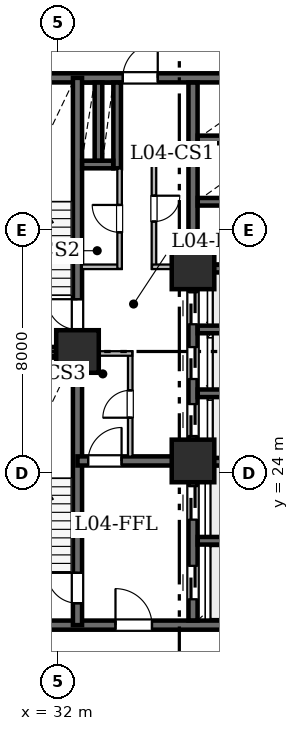
"""IFC4 building model, lengths in metres.
Left out: names, types, materials, properties, quantities, classifications, styles, units other than length and angle.
Written with IfcOpenShell. Run it as: python <this file> out.ifc"""

import sys

from ifc_helpers import new_model, si_unit, direction, frame, frame_2d, origin, origin_2d, place, context, subcontext, project, spatial, rectangle, hollow_rectangle, extrude, element, fill, save


model = new_model("IFC4")
c1 = context("Model", 3, precision=1e-05, world=origin(), true_north=direction((0.0, 1.0)))
c2 = subcontext(c1, "Body", "Model", "MODEL_VIEW")
j1 = project(units=[si_unit("LENGTHUNIT", "METRE"), si_unit("PLANEANGLEUNIT", "RADIAN")], contexts=[c1])
p1 = place(None, origin())
s1 = spatial("IfcSite", under=j1, at=p1, CompositionType="ELEMENT")
p2 = place(p1, origin())
s2 = spatial("IfcBuilding", under=s1, at=p2, CompositionType="ELEMENT")
p3 = place(p2, frame((0.0, 0.0, 20.4)))
s3 = spatial("IfcBuildingStorey", under=s2, at=p3, CompositionType="ELEMENT", Elevation=20.4)
for number, where, z_axis, x_axis in (
    (1, (32.65, 28.0, 0.0), (0.0, 0.0, 1.0), (1.0, 0.0, 0.0)),
    (2, (36.45, 24.4, 0.0), (0.0, 0.0, 1.0), (1.0, 0.0, 0.0)),
    (3, (36.45, 30.75, 0.0), (0.0, 0.0, 1.0), (1.0, 0.0, 0.0)),
):
    element("IfcColumn", number, at=place(p3, frame(where, z_axis=z_axis, x_axis=x_axis)), inside=s3, PredefinedType="COLUMN", context=c2, shape_type="SweptSolid", body=[
        extrude(hollow_rectangle(XDim=1.4, YDim=1.4, WallThickness=0.07, at=origin_2d()), origin(), (0.0, 0.0, 1.0), 4.2),
    ])
p4 = place(p3, frame((29.0, 19.0, 0.0), z_axis=(0.0, 0.0, 1.0), x_axis=(1.0, 0.0, 0.0)))
e4 = element("IfcWall", 4, at=p4, inside=s3, PredefinedType="SHEAR", context=c2, shape_type="SweptSolid", body=[
    extrude(rectangle(XDim=10.4, YDim=0.3, at=frame_2d((5.2, 0.0))), origin(), (0.0, 0.0, 1.0), 3.92),
])
p5 = place(p4, frame((4.9, 0.0, 0.0)))
e5 = element("IfcOpeningElement", 5, at=p5, cuts=e4, PredefinedType="OPENING", context=c2, shape_type="SweptSolid", body=[
    extrude(rectangle(XDim=1.2, YDim=2.15, at=frame_2d((0.6, 1.075))), frame((0.0, 0.16, 0.0), z_axis=(0.0, -1.0, 0.0), x_axis=(1.0, 0.0, 0.0)), (0.0, 0.0, 1.0), 0.32),
])
p6 = place(p3, frame((29.0, 37.0, 0.0), z_axis=(0.0, 0.0, 1.0), x_axis=(1.0, 0.0, 0.0)))
e6 = element("IfcWall", 6, at=p6, inside=s3, PredefinedType="SHEAR", context=c2, shape_type="SweptSolid", body=[
    extrude(rectangle(XDim=10.4, YDim=0.3, at=frame_2d((5.2, 0.0))), origin(), (0.0, 0.0, 1.0), 3.92),
])
p7 = place(p6, frame((5.14, 0.0, 0.0)))
e7 = element("IfcOpeningElement", 7, at=p7, cuts=e6, PredefinedType="OPENING", context=c2, shape_type="SweptSolid", body=[
    extrude(rectangle(XDim=1.15, YDim=2.2, at=frame_2d((0.575, 1.1))), frame((0.0, 0.16, 0.0), z_axis=(0.0, -1.0, 0.0), x_axis=(1.0, 0.0, 0.0)), (0.0, 0.0, 1.0), 0.32),
])
p8 = place(p3, frame((32.65, 19.0, 0.0), z_axis=(0.0, 0.0, 1.0), x_axis=(0.0, 1.0, 0.0)))
e8 = element("IfcWall", 8, at=p8, inside=s3, PredefinedType="SHEAR", context=c2, shape_type="SweptSolid", body=[
    extrude(rectangle(XDim=9.0, YDim=0.3, at=frame_2d((4.5, 0.0))), origin(), (0.0, 0.0, 1.0), 3.92),
])
p9 = place(p8, frame((0.72, 0.0, 0.0)))
e9 = element("IfcOpeningElement", 9, at=p9, cuts=e8, PredefinedType="OPENING", context=c2, shape_type="SweptSolid", body=[
    extrude(rectangle(XDim=1.0, YDim=2.15, at=frame_2d((0.5, 1.075))), frame((0.0, 0.16, 0.0), z_axis=(0.0, -1.0, 0.0), x_axis=(1.0, 0.0, 0.0)), (0.0, 0.0, 1.0), 0.32),
])
p10 = place(p3, frame((32.65, 28.0, 0.0), z_axis=(0.0, 0.0, 1.0), x_axis=(0.0, 1.0, 0.0)))
e10 = element("IfcWall", 10, at=p10, inside=s3, PredefinedType="SHEAR", context=c2, shape_type="SweptSolid", body=[
    extrude(rectangle(XDim=9.0, YDim=0.3, at=frame_2d((4.5, 0.0))), origin(), (0.0, 0.0, 1.0), 3.92),
])
p11 = place(p10, frame((0.72, 0.0, 0.0)))
e11 = element("IfcOpeningElement", 11, at=p11, cuts=e10, PredefinedType="OPENING", context=c2, shape_type="SweptSolid", body=[
    extrude(rectangle(XDim=1.0, YDim=2.15, at=frame_2d((0.5, 1.075))), frame((0.0, 0.16, 0.0), z_axis=(0.0, -1.0, 0.0), x_axis=(1.0, 0.0, 0.0)), (0.0, 0.0, 1.0), 0.32),
])
p12 = place(p3, frame((29.0, 28.0, 0.0), z_axis=(0.0, 0.0, 1.0), x_axis=(1.0, 0.0, 0.0)))
e12 = element("IfcWall", 12, at=p12, inside=s3, PredefinedType="SHEAR", context=c2, shape_type="SweptSolid", body=[
    extrude(rectangle(XDim=3.65, YDim=0.3, at=frame_2d((1.825, 0.0))), origin(), (0.0, 0.0, 1.0), 3.92),
])
p13 = place(p3, frame((32.65, 24.4, 0.0), z_axis=(0.0, 0.0, 1.0), x_axis=(1.0, 0.0, 0.0)))
e13 = element("IfcWall", 13, at=p13, inside=s3, PredefinedType="SHEAR", context=c2, shape_type="SweptSolid", body=[
    extrude(rectangle(XDim=3.8, YDim=0.3, at=frame_2d((1.9, 0.0))), origin(), (0.0, 0.0, 1.0), 3.92),
])
p14 = place(p13, frame((0.35, 0.0, 0.0)))
e14 = element("IfcOpeningElement", 14, at=p14, cuts=e13, PredefinedType="OPENING", context=c2, shape_type="SweptSolid", body=[
    extrude(rectangle(XDim=1.1, YDim=2.15, at=frame_2d((0.55, 1.075))), frame((0.0, 0.16, 0.0), z_axis=(0.0, -1.0, 0.0), x_axis=(1.0, 0.0, 0.0)), (0.0, 0.0, 1.0), 0.32),
])
p15 = place(p3, frame((36.45, 19.154, 0.0), z_axis=(0.0, 0.0, 1.0), x_axis=(0.0, 1.0, 0.0)))
e15 = element("IfcWall", 15, at=p15, inside=s3, PredefinedType="SHEAR", context=c2, shape_type="SweptSolid", body=[
    extrude(rectangle(XDim=4.546, YDim=0.3, at=frame_2d((2.273, 0.0))), origin(), (0.0, 0.0, 1.0), 3.92),
])
p16 = place(p15, frame((0.696, 0.0, 0.0)))
e16 = element("IfcOpeningElement", 16, at=p16, cuts=e15, PredefinedType="OPENING", context=c2, shape_type="SweptSolid", body=[
    extrude(rectangle(XDim=1.1, YDim=2.15, at=frame_2d((0.55, 1.075))), frame((0.0, 0.16, 0.0), z_axis=(0.0, -1.0, 0.0), x_axis=(1.0, 0.0, 0.0)), (0.0, 0.0, 1.0), 0.32),
])
p17 = place(p15, frame((3.316, 0.0, 0.0)))
e17 = element("IfcOpeningElement", 17, at=p17, cuts=e15, PredefinedType="OPENING", context=c2, shape_type="SweptSolid", body=[
    extrude(rectangle(XDim=1.1, YDim=2.15, at=frame_2d((0.55, 1.075))), frame((0.0, 0.16, 0.0), z_axis=(0.0, -1.0, 0.0), x_axis=(1.0, 0.0, 0.0)), (0.0, 0.0, 1.0), 0.32),
])
p18 = place(p3, frame((36.45, 25.1, 0.0), z_axis=(0.0, 0.0, 1.0), x_axis=(0.0, 1.0, 0.0)))
e18 = element("IfcWall", 18, at=p18, inside=s3, PredefinedType="SHEAR", context=c2, shape_type="SweptSolid", body=[
    extrude(rectangle(XDim=4.95, YDim=0.3, at=frame_2d((2.475, 0.0))), origin(), (0.0, 0.0, 1.0), 3.92),
])
p19 = place(p18, frame((0.12, 0.0, 0.0)))
e19 = element("IfcOpeningElement", 19, at=p19, cuts=e18, PredefinedType="OPENING", context=c2, shape_type="SweptSolid", body=[
    extrude(rectangle(XDim=1.05, YDim=2.15, at=frame_2d((0.525, 1.075))), frame((0.0, 0.16, 0.0), z_axis=(0.0, -1.0, 0.0), x_axis=(1.0, 0.0, 0.0)), (0.0, 0.0, 1.0), 0.32),
])
p20 = place(p18, frame((1.995, 0.0, 0.0)))
e20 = element("IfcOpeningElement", 20, at=p20, cuts=e18, PredefinedType="OPENING", context=c2, shape_type="SweptSolid", body=[
    extrude(rectangle(XDim=1.05, YDim=2.15, at=frame_2d((0.525, 1.075))), frame((0.0, 0.16, 0.0), z_axis=(0.0, -1.0, 0.0), x_axis=(1.0, 0.0, 0.0)), (0.0, 0.0, 1.0), 0.32),
])
p21 = place(p18, frame((3.795, 0.0, 0.0)))
e21 = element("IfcOpeningElement", 21, at=p21, cuts=e18, PredefinedType="OPENING", context=c2, shape_type="SweptSolid", body=[
    extrude(rectangle(XDim=1.05, YDim=2.15, at=frame_2d((0.525, 1.075))), frame((0.0, 0.16, 0.0), z_axis=(0.0, -1.0, 0.0), x_axis=(1.0, 0.0, 0.0)), (0.0, 0.0, 1.0), 0.32),
])
p22 = place(p3, frame((36.45, 31.45, 0.0), z_axis=(0.0, 0.0, 1.0), x_axis=(0.0, 1.0, 0.0)))
e22 = element("IfcWall", 22, at=p22, inside=s3, PredefinedType="SHEAR", context=c2, shape_type="SweptSolid", body=[
    extrude(rectangle(XDim=5.396, YDim=0.3, at=frame_2d((2.698, 0.0))), origin(), (0.0, 0.0, 1.0), 3.92),
])
for number, where, z_axis, x_axis in (
    (23, (36.604, 21.775, 0.0), (0.0, 0.0, 1.0), (1.0, 0.0, 0.0)),
    (24, (36.604, 24.375, 0.0), (0.0, 0.0, 1.0), (1.0, 0.0, 0.0)),
    (25, (36.604, 26.625, 0.0), (0.0, 0.0, 1.0), (1.0, 0.0, 0.0)),
    (26, (36.604, 28.725, 0.0), (0.0, 0.0, 1.0), (1.0, 0.0, 0.0)),
    (27, (36.604, 30.725, 0.0), (0.0, 0.0, 1.0), (1.0, 0.0, 0.0)),
    (28, (36.604, 32.925, 0.0), (0.0, 0.0, 1.0), (1.0, 0.0, 0.0)),
    (29, (36.604, 34.975, 0.0), (0.0, 0.0, 1.0), (1.0, 0.0, 0.0)),
):
    element("IfcWall", number, at=place(p3, frame(where, z_axis=z_axis, x_axis=x_axis)), inside=s3, PredefinedType="SHEAR", context=c2, shape_type="SweptSolid", body=[
        extrude(rectangle(XDim=2.642, YDim=0.25, at=frame_2d((1.321, 0.0))), origin(), (0.0, 0.0, 1.0), 3.92),
    ])
p23 = place(p3, frame((33.955, 34.025, 0.0), z_axis=(0.0, 0.0, 1.0), x_axis=(0.0, 1.0, 0.0)))
e30 = element("IfcWall", 30, at=p23, inside=s3, PredefinedType="SHEAR", context=c2, shape_type="SweptSolid", body=[
    extrude(rectangle(XDim=2.821, YDim=0.25, at=frame_2d((1.411, 0.0))), origin(), (0.0, 0.0, 1.0), 3.92),
])
p24 = place(p3, frame((32.804, 34.15, 0.0), z_axis=(0.0, 0.0, 1.0), x_axis=(1.0, 0.0, 0.0)))
e31 = element("IfcWall", 31, at=p24, inside=s3, PredefinedType="SHEAR", context=c2, shape_type="SweptSolid", body=[
    extrude(rectangle(XDim=1.022, YDim=0.25, at=frame_2d((0.511, 0.0))), origin(), (0.0, 0.0, 1.0), 3.92),
])
p25 = place(p3, frame((33.34, 34.279, 0.0), z_axis=(0.0, 0.0, 1.0), x_axis=(0.0, 1.0, 0.0)))
e32 = element("IfcWall", 32, at=p25, inside=s3, PredefinedType="SHEAR", context=c2, shape_type="SweptSolid", body=[
    extrude(rectangle(XDim=2.567, YDim=0.25, at=frame_2d((1.283, 0.0))), origin(), (0.0, 0.0, 1.0), 3.92),
])
p26 = place(p3, frame((36.306, 34.615, 0.0), z_axis=(0.0, 0.0, 1.0), x_axis=(-1.0, 0.0, 0.0)))
e33 = element("IfcWall", 33, at=p26, inside=s3, PredefinedType="STANDARD", context=c2, shape_type="SweptSolid", body=[
    extrude(rectangle(XDim=1.206, YDim=0.15, at=frame_2d((0.603, 0.0))), origin(), (0.0, 0.0, 1.0), 3.92),
])
p27 = place(p3, frame((35.165, 34.678, 0.0), z_axis=(0.0, 0.0, 1.0), x_axis=(0.0, -1.0, 0.0)))
e34 = element("IfcWall", 34, at=p27, inside=s3, PredefinedType="STANDARD", context=c2, shape_type="SweptSolid", body=[
    extrude(rectangle(XDim=3.958, YDim=0.15, at=frame_2d((1.979, 0.0))), origin(), (0.0, 0.0, 1.0), 3.92),
])
p28 = place(p27, frame((1.554, 0.0, 0.0)))
e35 = element("IfcOpeningElement", 35, at=p28, cuts=e34, PredefinedType="OPENING", context=c2, shape_type="SweptSolid", body=[
    extrude(rectangle(XDim=0.85, YDim=2.1, at=frame_2d((0.425, 1.05))), frame((0.0, 0.085, 0.0), z_axis=(0.0, -1.0, 0.0), x_axis=(1.0, 0.0, 0.0)), (0.0, 0.0, 1.0), 0.17),
])
p29 = place(p3, frame((35.102, 30.785, 0.0), z_axis=(0.0, 0.0, 1.0), x_axis=(1.0, 0.0, 0.0)))
e36 = element("IfcWall", 36, at=p29, inside=s3, PredefinedType="STANDARD", context=c2, shape_type="SweptSolid", body=[
    extrude(rectangle(XDim=1.198, YDim=0.15, at=frame_2d((0.599, 0.0))), origin(), (0.0, 0.0, 1.0), 3.92),
])
p30 = place(p3, frame((32.794, 30.785, 0.0), z_axis=(0.0, 0.0, 1.0), x_axis=(1.0, 0.0, 0.0)))
e37 = element("IfcWall", 37, at=p30, inside=s3, PredefinedType="STANDARD", context=c2, shape_type="SweptSolid", body=[
    extrude(rectangle(XDim=1.306, YDim=0.15, at=frame_2d((0.653, 0.0))), origin(), (0.0, 0.0, 1.0), 3.377),
])
p31 = place(p3, frame((34.035, 30.72, 0.0), z_axis=(0.0, 0.0, 1.0), x_axis=(0.0, 1.0, 0.0)))
e38 = element("IfcWall", 38, at=p31, inside=s3, PredefinedType="STANDARD", context=c2, shape_type="SweptSolid", body=[
    extrude(rectangle(XDim=3.3, YDim=0.15, at=frame_2d((1.65, 0.0))), origin(), (0.0, 0.0, 1.0), 3.92),
])
p32 = place(p31, frame((1.2, 0.0, 0.0)))
e39 = element("IfcOpeningElement", 39, at=p32, cuts=e38, PredefinedType="OPENING", context=c2, shape_type="SweptSolid", body=[
    extrude(rectangle(XDim=0.9, YDim=2.1, at=frame_2d((0.45, 1.05))), frame((0.0, 0.085, 0.0), z_axis=(0.0, -1.0, 0.0), x_axis=(1.0, 0.0, 0.0)), (0.0, 0.0, 1.0), 0.17),
])
p33 = place(p3, frame((34.385, 24.544, 0.0), z_axis=(0.0, 0.0, 1.0), x_axis=(0.0, 1.0, 0.0)))
e40 = element("IfcWall", 40, at=p33, inside=s3, PredefinedType="STANDARD", context=c2, shape_type="SweptSolid", body=[
    extrude(rectangle(XDim=3.456, YDim=0.15, at=frame_2d((1.728, 0.0))), origin(), (0.0, 0.0, 1.0), 3.92),
])
p34 = place(p33, frame((1.278, 0.0, 0.0)))
e41 = element("IfcOpeningElement", 41, at=p34, cuts=e40, PredefinedType="OPENING", context=c2, shape_type="SweptSolid", body=[
    extrude(rectangle(XDim=0.9, YDim=2.1, at=frame_2d((0.45, 1.05))), frame((0.0, 0.085, 0.0), z_axis=(0.0, -1.0, 0.0), x_axis=(1.0, 0.0, 0.0)), (0.0, 0.0, 1.0), 0.17),
])
p35 = place(p3, frame((34.45, 27.935, 0.0), z_axis=(0.0, 0.0, 1.0), x_axis=(-1.0, 0.0, 0.0)))
e42 = element("IfcWall", 42, at=p35, inside=s3, PredefinedType="STANDARD", context=c2, shape_type="SweptSolid", body=[
    extrude(rectangle(XDim=1.656, YDim=0.15, at=frame_2d((0.828, 0.0))), origin(), (0.0, 0.0, 1.0), 3.377),
])
p36 = place(p9, origin())
e43 = element("IfcDoor", 43, at=p36, inside=s3, OperationType="SINGLE_SWING_RIGHT", PredefinedType="DOOR", context=c2, shape_type="SweptSolid", body=[
    extrude(rectangle(XDim=1.0, YDim=2.15, at=frame_2d((0.5, 1.075))), frame((0.0, 0.025, 0.0), z_axis=(0.0, -1.0, 0.0), x_axis=(1.0, 0.0, 0.0)), (0.0, 0.0, 1.0), 0.05),
])
fill(e9, e43)
p37 = place(p11, origin())
e44 = element("IfcDoor", 44, at=p37, inside=s3, OperationType="SINGLE_SWING_RIGHT", PredefinedType="DOOR", context=c2, shape_type="SweptSolid", body=[
    extrude(rectangle(XDim=1.0, YDim=2.15, at=frame_2d((0.5, 1.075))), frame((0.0, 0.025, 0.0), z_axis=(0.0, -1.0, 0.0), x_axis=(1.0, 0.0, 0.0)), (0.0, 0.0, 1.0), 0.05),
])
fill(e11, e44)
p38 = place(p14, origin())
e45 = element("IfcDoor", 45, at=p38, inside=s3, OperationType="SINGLE_SWING_RIGHT", PredefinedType="DOOR", context=c2, shape_type="SweptSolid", body=[
    extrude(rectangle(XDim=1.1, YDim=2.15, at=frame_2d((0.55, 1.075))), frame((0.0, 0.025, 0.0), z_axis=(0.0, -1.0, 0.0), x_axis=(1.0, 0.0, 0.0)), (0.0, 0.0, 1.0), 0.05),
])
fill(e14, e45)
p39 = place(p5, origin())
e46 = element("IfcDoor", 46, at=p39, inside=s3, OperationType="SINGLE_SWING_LEFT", PredefinedType="DOOR", context=c2, shape_type="SweptSolid", body=[
    extrude(rectangle(XDim=1.2, YDim=2.15, at=frame_2d((0.6, 1.075))), frame((0.0, 0.025, 0.0), z_axis=(0.0, -1.0, 0.0), x_axis=(1.0, 0.0, 0.0)), (0.0, 0.0, 1.0), 0.05),
])
fill(e5, e46)
p40 = place(p7, origin())
e47 = element("IfcDoor", 47, at=p40, inside=s3, OperationType="SINGLE_SWING_RIGHT", PredefinedType="DOOR", context=c2, shape_type="SweptSolid", body=[
    extrude(rectangle(XDim=1.15, YDim=2.2, at=frame_2d((0.575, 1.1))), frame((0.0, 0.025, 0.0), z_axis=(0.0, -1.0, 0.0), x_axis=(1.0, 0.0, 0.0)), (0.0, 0.0, 1.0), 0.05),
])
fill(e7, e47)
p41 = place(p16, origin())
e48 = element("IfcDoor", 48, at=p41, inside=s3, OperationType="SLIDING_TO_LEFT", PredefinedType="DOOR", context=c2, shape_type="SweptSolid", body=[
    extrude(rectangle(XDim=1.1, YDim=2.15, at=frame_2d((0.55, 1.075))), frame((0.0, 0.025, 0.0), z_axis=(0.0, -1.0, 0.0), x_axis=(1.0, 0.0, 0.0)), (0.0, 0.0, 1.0), 0.05),
])
fill(e16, e48)
p42 = place(p17, origin())
e49 = element("IfcDoor", 49, at=p42, inside=s3, OperationType="SLIDING_TO_LEFT", PredefinedType="DOOR", context=c2, shape_type="SweptSolid", body=[
    extrude(rectangle(XDim=1.1, YDim=2.15, at=frame_2d((0.55, 1.075))), frame((0.0, 0.025, 0.0), z_axis=(0.0, -1.0, 0.0), x_axis=(1.0, 0.0, 0.0)), (0.0, 0.0, 1.0), 0.05),
])
fill(e17, e49)
p43 = place(p19, origin())
e50 = element("IfcDoor", 50, at=p43, inside=s3, OperationType="SLIDING_TO_LEFT", PredefinedType="DOOR", context=c2, shape_type="SweptSolid", body=[
    extrude(rectangle(XDim=1.05, YDim=2.15, at=frame_2d((0.525, 1.075))), frame((0.0, 0.025, 0.0), z_axis=(0.0, -1.0, 0.0), x_axis=(1.0, 0.0, 0.0)), (0.0, 0.0, 1.0), 0.05),
])
fill(e19, e50)
p44 = place(p20, origin())
e51 = element("IfcDoor", 51, at=p44, inside=s3, OperationType="SLIDING_TO_LEFT", PredefinedType="DOOR", context=c2, shape_type="SweptSolid", body=[
    extrude(rectangle(XDim=1.05, YDim=2.15, at=frame_2d((0.525, 1.075))), frame((0.0, 0.025, 0.0), z_axis=(0.0, -1.0, 0.0), x_axis=(1.0, 0.0, 0.0)), (0.0, 0.0, 1.0), 0.05),
])
fill(e20, e51)
p45 = place(p21, origin())
e52 = element("IfcDoor", 52, at=p45, inside=s3, OperationType="SLIDING_TO_LEFT", PredefinedType="DOOR", context=c2, shape_type="SweptSolid", body=[
    extrude(rectangle(XDim=1.05, YDim=2.15, at=frame_2d((0.525, 1.075))), frame((0.0, 0.025, 0.0), z_axis=(0.0, -1.0, 0.0), x_axis=(1.0, 0.0, 0.0)), (0.0, 0.0, 1.0), 0.05),
])
fill(e21, e52)
p46 = place(p28, origin())
e53 = element("IfcDoor", 53, at=p46, inside=s3, OperationType="SINGLE_SWING_LEFT", PredefinedType="DOOR", context=c2, shape_type="SweptSolid", body=[
    extrude(rectangle(XDim=0.85, YDim=2.1, at=frame_2d((0.425, 1.05))), frame((0.0, 0.025, 0.0), z_axis=(0.0, -1.0, 0.0), x_axis=(1.0, 0.0, 0.0)), (0.0, 0.0, 1.0), 0.05),
])
fill(e35, e53)
p47 = place(p32, origin())
e54 = element("IfcDoor", 54, at=p47, inside=s3, OperationType="SINGLE_SWING_RIGHT", PredefinedType="DOOR", context=c2, shape_type="SweptSolid", body=[
    extrude(rectangle(XDim=0.9, YDim=2.1, at=frame_2d((0.45, 1.05))), frame((0.0, 0.025, 0.0), z_axis=(0.0, -1.0, 0.0), x_axis=(1.0, 0.0, 0.0)), (0.0, 0.0, 1.0), 0.05),
])
fill(e39, e54)
p48 = place(p34, origin())
e55 = element("IfcDoor", 55, at=p48, inside=s3, OperationType="SINGLE_SWING_LEFT", PredefinedType="DOOR", context=c2, shape_type="SweptSolid", body=[
    extrude(rectangle(XDim=0.9, YDim=2.1, at=frame_2d((0.45, 1.05))), frame((0.0, 0.025, 0.0), z_axis=(0.0, -1.0, 0.0), x_axis=(1.0, 0.0, 0.0)), (0.0, 0.0, 1.0), 0.05),
])
fill(e41, e55)
save(model, sys.argv[1])
